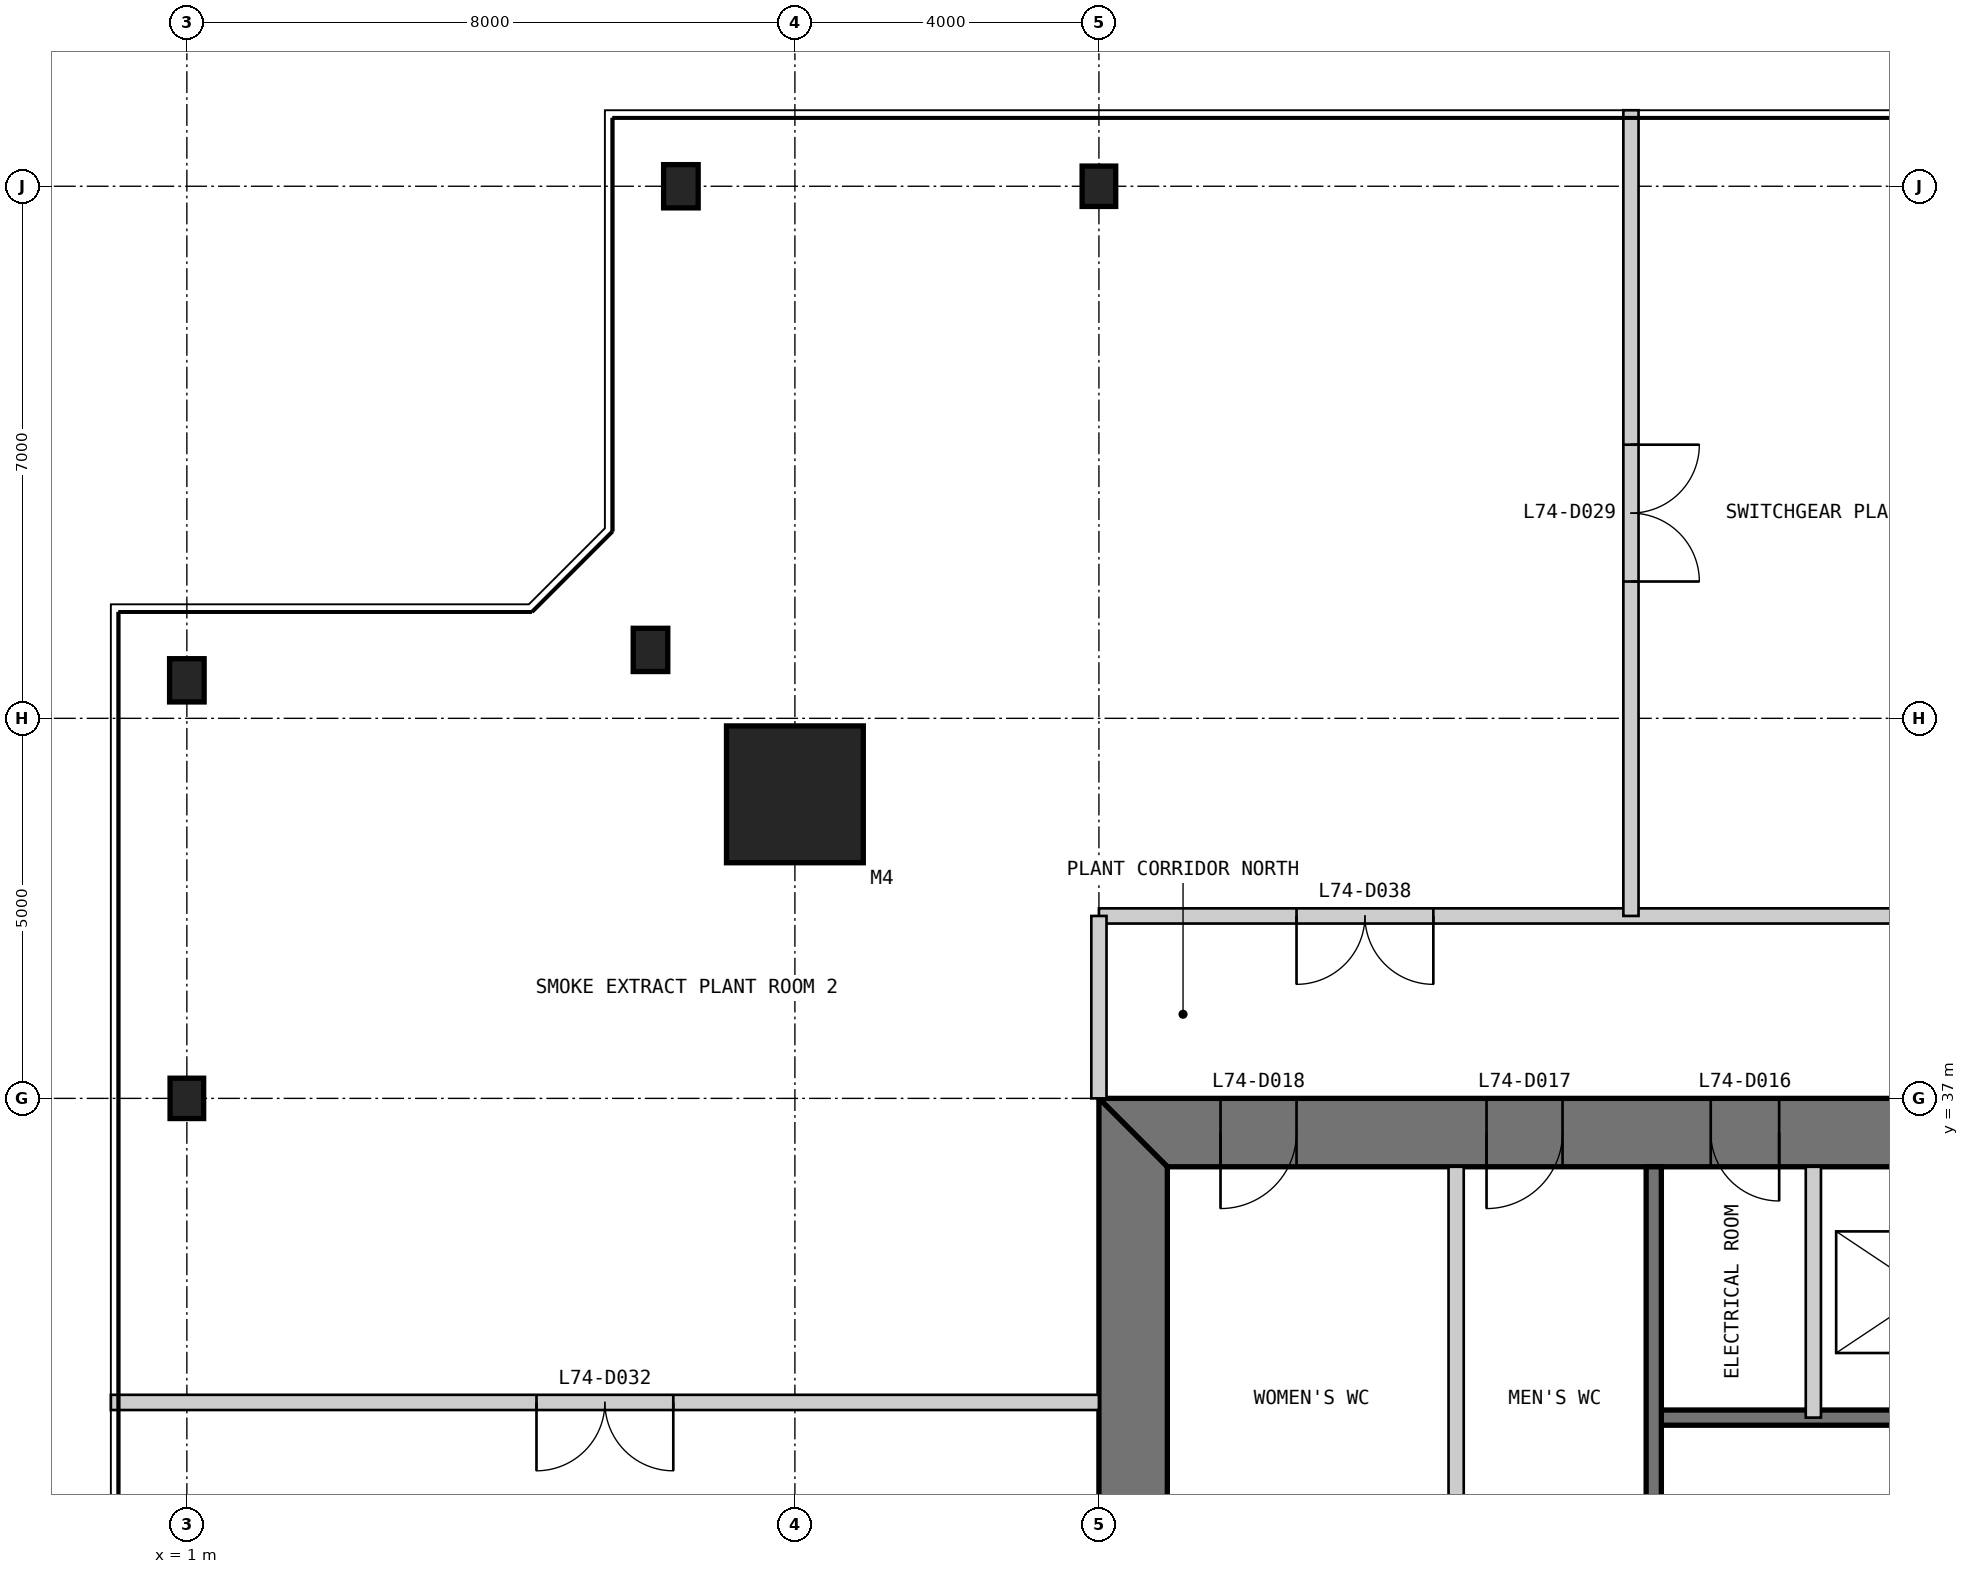
"""IFC4 building model, lengths in metres.
Left out: names, types, materials, properties, quantities, classifications, styles, units other than length and angle.
Written with IfcOpenShell. Run it as: python <this file> out.ifc"""

import sys

from ifc_helpers import new_model, si_unit, direction, frame, frame_2d, origin, origin_2d, place, context, subcontext, project, spatial, polyline, rectangle, i_section, outline, extrude, element, fill, save


model = new_model("IFC4")
c1 = context("Model", 3, precision=1e-05, world=origin(), true_north=direction((0.0, 1.0)))
c2 = subcontext(c1, "Body", "Model", "MODEL_VIEW")
j1 = project(units=[si_unit("LENGTHUNIT", "METRE"), si_unit("PLANEANGLEUNIT", "RADIAN")], contexts=[c1])
p1 = place(None, origin())
s1 = spatial("IfcSite", under=j1, at=p1, CompositionType="ELEMENT")
p2 = place(p1, origin())
s2 = spatial("IfcBuilding", under=s1, at=p2, CompositionType="ELEMENT")
p3 = place(p2, frame((0.0, 0.0, 307.8)))
s3 = spatial("IfcBuildingStorey", under=s2, at=p3, CompositionType="ELEMENT", Elevation=307.8)
p4 = place(p3, frame((9.0, 41.0, 0.0), z_axis=(0.0, 0.0, 1.0), x_axis=(1.0, 0.0, 0.0)))
e1 = element("IfcColumn", 1, at=p4, inside=s3, PredefinedType="COLUMN", context=c2, shape_type="SweptSolid", body=[
    extrude(rectangle(XDim=1.8, YDim=1.8, at=origin_2d()), origin(), (0.0, 0.0, 1.0), 5.75),
])
p5 = place(p3, frame((13.0, 49.0, 0.0), z_axis=(0.0, 0.0, 1.0), x_axis=(1.0, 0.0, 0.0)))
e2 = element("IfcColumn", 2, at=p5, inside=s3, PredefinedType="COLUMN", context=c2, shape_type="SweptSolid", body=[
    extrude(i_section(OverallWidth=0.442, OverallDepth=0.531, WebThickness=0.066, FlangeThickness=0.106, at=origin_2d()), origin(), (0.0, 0.0, 1.0), 5.75),
])
for number, where, z_axis, x_axis in (
    (3, (7.5, 49.0, 0.0), (0.0, 0.0, 1.0), (1.0, 0.0, 0.0)),
    (4, (7.1, 42.9, 0.0), (0.0, 0.0, 1.0), (1.0, 0.0, 0.0)),
    (5, (1.0, 42.5, 0.0), (0.0, 0.0, 1.0), (1.0, 0.0, 0.0)),
):
    element("IfcColumn", number, at=place(p3, frame(where, z_axis=z_axis, x_axis=x_axis)), inside=s3, PredefinedType="COLUMN", context=c2, shape_type="SweptSolid", body=[
        extrude(i_section(OverallWidth=0.455, OverallDepth=0.569, WebThickness=0.078, FlangeThickness=0.125, at=origin_2d()), origin(), (0.0, 0.0, 1.0), 5.75),
    ])
p6 = place(p3, frame((1.0, 37.0, 0.0), z_axis=(0.0, 0.0, 1.0), x_axis=(1.0, 0.0, 0.0)))
e6 = element("IfcColumn", 6, at=p6, inside=s3, PredefinedType="COLUMN", context=c2, shape_type="SweptSolid", body=[
    extrude(i_section(OverallWidth=0.442, OverallDepth=0.531, WebThickness=0.066, FlangeThickness=0.106, at=origin_2d()), origin(), (0.0, 0.0, 1.0), 5.75),
])
p7 = place(p3, frame((37.0, 36.55, 0.0), z_axis=(0.0, 0.0, 1.0), x_axis=(-1.0, 0.0, 0.0)))
e7 = element("IfcWall", 7, at=p7, inside=s3, PredefinedType="SHEAR", context=c2, shape_type="SweptSolid", body=[
    extrude(outline(polyline([(0.0, -0.45), (24.0, -0.45), (23.1, 0.45), (0.9, 0.45), (0.0, -0.45)])), origin(), (0.0, 0.0, 1.0), 5.75),
])
p8 = place(p7, frame((4.9, 0.0, 0.0)))
e8 = element("IfcOpeningElement", 8, at=p8, cuts=e7, PredefinedType="OPENING", context=c2, shape_type="SweptSolid", body=[
    extrude(rectangle(XDim=1.0, YDim=2.2, at=frame_2d((0.5, 1.1))), frame((0.0, 0.46, 0.0), z_axis=(0.0, -1.0, 0.0), x_axis=(1.0, 0.0, 0.0)), (0.0, 0.0, 1.0), 0.92),
])
p9 = place(p7, frame((8.9, 0.0, 0.0)))
e9 = element("IfcOpeningElement", 9, at=p9, cuts=e7, PredefinedType="OPENING", context=c2, shape_type="SweptSolid", body=[
    extrude(rectangle(XDim=1.1, YDim=2.2, at=frame_2d((0.55, 1.1))), frame((0.0, 0.46, 0.0), z_axis=(0.0, -1.0, 0.0), x_axis=(1.0, 0.0, 0.0)), (0.0, 0.0, 1.0), 0.92),
])
p10 = place(p7, frame((15.05, 0.0, 0.0)))
e10 = element("IfcOpeningElement", 10, at=p10, cuts=e7, PredefinedType="OPENING", context=c2, shape_type="SweptSolid", body=[
    extrude(rectangle(XDim=0.9, YDim=2.2, at=frame_2d((0.45, 1.1))), frame((0.0, 0.46, 0.0), z_axis=(0.0, -1.0, 0.0), x_axis=(1.0, 0.0, 0.0)), (0.0, 0.0, 1.0), 0.92),
])
p11 = place(p7, frame((17.9, 0.0, 0.0)))
e11 = element("IfcOpeningElement", 11, at=p11, cuts=e7, PredefinedType="OPENING", context=c2, shape_type="SweptSolid", body=[
    extrude(rectangle(XDim=1.0, YDim=2.2, at=frame_2d((0.5, 1.1))), frame((0.0, 0.46, 0.0), z_axis=(0.0, -1.0, 0.0), x_axis=(1.0, 0.0, 0.0)), (0.0, 0.0, 1.0), 0.92),
])
p12 = place(p7, frame((21.4, 0.0, 0.0)))
e12 = element("IfcOpeningElement", 12, at=p12, cuts=e7, PredefinedType="OPENING", context=c2, shape_type="SweptSolid", body=[
    extrude(rectangle(XDim=1.0, YDim=2.2, at=frame_2d((0.5, 1.1))), frame((0.0, 0.46, 0.0), z_axis=(0.0, -1.0, 0.0), x_axis=(1.0, 0.0, 0.0)), (0.0, 0.0, 1.0), 0.92),
])
p13 = place(p3, frame((13.45, 36.1, 0.0), z_axis=(0.0, 0.0, 1.0), x_axis=(0.0, -1.0, 0.0)))
e13 = element("IfcWall", 13, at=p13, inside=s3, PredefinedType="SHEAR", context=c2, shape_type="SweptSolid", body=[
    extrude(outline(polyline([(-0.9, -0.45), (23.1, -0.45), (22.2, 0.45), (0.0, 0.45), (-0.9, -0.45)])), origin(), (0.0, 0.0, 1.0), 5.75),
])
p14 = place(p13, frame((20.2, 0.0, 0.0)))
e14 = element("IfcOpeningElement", 14, at=p14, cuts=e13, PredefinedType="OPENING", context=c2, shape_type="SweptSolid", body=[
    extrude(rectangle(XDim=1.0, YDim=2.2, at=frame_2d((0.5, 1.1))), frame((0.0, 0.46, 0.0), z_axis=(0.0, -1.0, 0.0), x_axis=(1.0, 0.0, 0.0)), (0.0, 0.0, 1.0), 0.92),
])
p15 = place(p13, frame((17.25, 0.0, 0.0)))
e15 = element("IfcOpeningElement", 15, at=p15, cuts=e13, PredefinedType="OPENING", context=c2, shape_type="SweptSolid", body=[
    extrude(rectangle(XDim=0.9, YDim=2.2, at=frame_2d((0.45, 1.1))), frame((0.0, 0.46, 0.0), z_axis=(0.0, -1.0, 0.0), x_axis=(1.0, 0.0, 0.0)), (0.0, 0.0, 1.0), 0.92),
])
p16 = place(p3, frame((29.7, 32.8, 0.0), z_axis=(0.0, 0.0, 1.0), x_axis=(-1.0, 0.0, 0.0)))
e16 = element("IfcWall", 16, at=p16, inside=s3, PredefinedType="SOLIDWALL", context=c2, shape_type="SweptSolid", body=[
    extrude(rectangle(XDim=9.4, YDim=0.2, at=frame_2d((4.7, 0.0))), origin(), (0.0, 0.0, 1.0), 5.75),
])
p17 = place(p16, frame((0.25, 0.0, 0.0)))
e17 = element("IfcOpeningElement", 17, at=p17, cuts=e16, PredefinedType="OPENING", context=c2, shape_type="SweptSolid", body=[
    extrude(rectangle(XDim=1.0, YDim=2.2, at=frame_2d((0.5, 1.1))), frame((0.0, 0.11, 0.0), z_axis=(0.0, -1.0, 0.0), x_axis=(1.0, 0.0, 0.0)), (0.0, 0.0, 1.0), 0.22),
])
p18 = place(p3, frame((22.4, 36.1, 0.0), z_axis=(0.0, 0.0, 1.0), x_axis=(0.0, -1.0, 0.0)))
e18 = element("IfcWall", 18, at=p18, inside=s3, PredefinedType="PARTITIONING", context=c2, shape_type="SweptSolid", body=[
    extrude(rectangle(XDim=3.3, YDim=0.2, at=frame_2d((1.65, 0.0))), origin(), (0.0, 0.0, 1.0), 5.75),
])
p19 = place(p3, frame((20.3, 36.1, 0.0), z_axis=(0.0, 0.0, 1.0), x_axis=(0.0, -1.0, 0.0)))
e19 = element("IfcWall", 19, at=p19, inside=s3, PredefinedType="SOLIDWALL", context=c2, shape_type="SweptSolid", body=[
    extrude(rectangle(XDim=6.1, YDim=0.2, at=frame_2d((3.05, 0.0))), origin(), (0.0, 0.0, 1.0), 5.75),
])
p20 = place(p3, frame((17.7, 36.1, 0.0), z_axis=(0.0, 0.0, 1.0), x_axis=(0.0, -1.0, 0.0)))
e20 = element("IfcWall", 20, at=p20, inside=s3, PredefinedType="PARTITIONING", context=c2, shape_type="SweptSolid", body=[
    extrude(rectangle(XDim=6.1, YDim=0.2, at=frame_2d((3.05, 0.0))), origin(), (0.0, 0.0, 1.0), 5.75),
])
p21 = place(p3, frame((13.0, 39.4, 0.0), z_axis=(0.0, 0.0, 1.0), x_axis=(1.0, 0.0, 0.0)))
e21 = element("IfcWall", 21, at=p21, inside=s3, PredefinedType="PARTITIONING", context=c2, shape_type="SweptSolid", body=[
    extrude(rectangle(XDim=24.0, YDim=0.2, at=frame_2d((12.0, 0.0))), origin(), (0.0, 0.0, 1.0), 5.75),
])
p22 = place(p21, frame((19.35, 0.0, 0.0)))
e22 = element("IfcOpeningElement", 22, at=p22, cuts=e21, PredefinedType="OPENING", context=c2, shape_type="SweptSolid", body=[
    extrude(rectangle(XDim=1.8, YDim=2.4, at=frame_2d((0.9, 1.2))), frame((0.0, 0.11, 0.0), z_axis=(0.0, -1.0, 0.0), x_axis=(1.0, 0.0, 0.0)), (0.0, 0.0, 1.0), 0.22),
])
p23 = place(p21, frame((2.6, 0.0, 0.0)))
e23 = element("IfcOpeningElement", 23, at=p23, cuts=e21, PredefinedType="OPENING", context=c2, shape_type="SweptSolid", body=[
    extrude(rectangle(XDim=1.8, YDim=2.4, at=frame_2d((0.9, 1.2))), frame((0.0, 0.11, 0.0), z_axis=(0.0, -1.0, 0.0), x_axis=(1.0, 0.0, 0.0)), (0.0, 0.0, 1.0), 0.22),
])
p24 = place(p21, frame((10.85, 0.0, 0.0)))
e24 = element("IfcOpeningElement", 24, at=p24, cuts=e21, PredefinedType="OPENING", context=c2, shape_type="SweptSolid", body=[
    extrude(rectangle(XDim=1.8, YDim=2.4, at=frame_2d((0.9, 1.2))), frame((0.0, 0.11, 0.0), z_axis=(0.0, -1.0, 0.0), x_axis=(1.0, 0.0, 0.0)), (0.0, 0.0, 1.0), 0.22),
])
p25 = place(p3, frame((13.0, 37.0, 0.0), z_axis=(0.0, 0.0, 1.0), x_axis=(0.0, 1.0, 0.0)))
e25 = element("IfcWall", 25, at=p25, inside=s3, PredefinedType="PARTITIONING", context=c2, shape_type="SweptSolid", body=[
    extrude(rectangle(XDim=2.4, YDim=0.2, at=frame_2d((1.2, 0.0))), origin(), (0.0, 0.0, 1.0), 4.802),
])
p26 = place(p3, frame((20.0, 39.4, 0.0), z_axis=(0.0, 0.0, 1.0), x_axis=(0.0, 1.0, 0.0)))
e26 = element("IfcWall", 26, at=p26, inside=s3, PredefinedType="PARTITIONING", context=c2, shape_type="SweptSolid", body=[
    extrude(rectangle(XDim=10.6, YDim=0.2, at=frame_2d((5.3, 0.0))), origin(), (0.0, 0.0, 1.0), 5.75),
])
p27 = place(p26, frame((4.4, 0.0, 0.0)))
e27 = element("IfcOpeningElement", 27, at=p27, cuts=e26, PredefinedType="OPENING", context=c2, shape_type="SweptSolid", body=[
    extrude(rectangle(XDim=1.8, YDim=2.4, at=frame_2d((0.9, 1.2))), frame((0.0, 0.11, 0.0), z_axis=(0.0, -1.0, 0.0), x_axis=(1.0, 0.0, 0.0)), (0.0, 0.0, 1.0), 0.22),
])
p28 = place(p3, frame((0.0, 33.0, 0.0), z_axis=(0.0, 0.0, 1.0), x_axis=(1.0, 0.0, 0.0)))
e28 = element("IfcWall", 28, at=p28, inside=s3, PredefinedType="PARTITIONING", context=c2, shape_type="SweptSolid", body=[
    extrude(rectangle(XDim=13.0, YDim=0.2, at=frame_2d((6.5, 0.0))), origin(), (0.0, 0.0, 1.0), 5.75),
])
p29 = place(p28, frame((5.6, 0.0, 0.0)))
e29 = element("IfcOpeningElement", 29, at=p29, cuts=e28, PredefinedType="OPENING", context=c2, shape_type="SweptSolid", body=[
    extrude(rectangle(XDim=1.8, YDim=2.4, at=frame_2d((0.9, 1.2))), frame((0.0, 0.11, 0.0), z_axis=(0.0, -1.0, 0.0), x_axis=(1.0, 0.0, 0.0)), (0.0, 0.0, 1.0), 0.22),
])
p30 = place(p10, origin())
e30 = element("IfcDoor", 30, at=p30, inside=s3, OperationType="SINGLE_SWING_LEFT", PredefinedType="DOOR", context=c2, shape_type="SweptSolid", body=[
    extrude(rectangle(XDim=0.9, YDim=2.2, at=frame_2d((0.45, 1.1))), frame((0.0, 0.025, 0.0), z_axis=(0.0, -1.0, 0.0), x_axis=(1.0, 0.0, 0.0)), (0.0, 0.0, 1.0), 0.05),
    extrude(outline(polyline([(0.0, 0.0), (0.04, 0.0), (0.04, 2.16), (0.86, 2.16), (0.86, 0.0), (0.9, 0.0), (0.9, 2.2), (0.0, 2.2), (0.0, 0.0)])), frame((0.0, 0.3, 0.0), z_axis=(0.0, -1.0, 0.0), x_axis=(1.0, 0.0, 0.0)), (0.0, 0.0, 1.0), 0.6),
])
fill(e10, e30)
p31 = place(p11, origin())
e31 = element("IfcDoor", 31, at=p31, inside=s3, OperationType="SINGLE_SWING_RIGHT", PredefinedType="DOOR", context=c2, shape_type="SweptSolid", body=[
    extrude(rectangle(XDim=1.0, YDim=2.2, at=frame_2d((0.5, 1.1))), frame((0.0, 0.025, 0.0), z_axis=(0.0, -1.0, 0.0), x_axis=(1.0, 0.0, 0.0)), (0.0, 0.0, 1.0), 0.05),
    extrude(outline(polyline([(0.0, 0.0), (0.04, 0.0), (0.04, 2.16), (0.96, 2.16), (0.96, 0.0), (1.0, 0.0), (1.0, 2.2), (0.0, 2.2), (0.0, 0.0)])), frame((0.0, 0.3, 0.0), z_axis=(0.0, -1.0, 0.0), x_axis=(1.0, 0.0, 0.0)), (0.0, 0.0, 1.0), 0.6),
])
fill(e11, e31)
p32 = place(p12, origin())
e32 = element("IfcDoor", 32, at=p32, inside=s3, OperationType="SINGLE_SWING_RIGHT", PredefinedType="DOOR", context=c2, shape_type="SweptSolid", body=[
    extrude(rectangle(XDim=1.0, YDim=2.2, at=frame_2d((0.5, 1.1))), frame((0.0, 0.025, 0.0), z_axis=(0.0, -1.0, 0.0), x_axis=(1.0, 0.0, 0.0)), (0.0, 0.0, 1.0), 0.05),
    extrude(outline(polyline([(0.0, 0.0), (0.04, 0.0), (0.04, 2.16), (0.96, 2.16), (0.96, 0.0), (1.0, 0.0), (1.0, 2.2), (0.0, 2.2), (0.0, 0.0)])), frame((0.0, 0.3, 0.0), z_axis=(0.0, -1.0, 0.0), x_axis=(1.0, 0.0, 0.0)), (0.0, 0.0, 1.0), 0.6),
])
fill(e12, e32)
p33 = place(p27, frame((1.8, 0.0, 0.0), z_axis=(0.0, 0.0, 1.0), x_axis=(-1.0, 0.0, 0.0)))
e33 = element("IfcDoor", 33, at=p33, inside=s3, OperationType="DOUBLE_DOOR_SINGLE_SWING", PredefinedType="DOOR", context=c2, shape_type="SweptSolid", body=[
    extrude(rectangle(XDim=1.8, YDim=2.4, at=frame_2d((0.9, 1.2))), frame((0.0, 0.025, 0.0), z_axis=(0.0, -1.0, 0.0), x_axis=(1.0, 0.0, 0.0)), (0.0, 0.0, 1.0), 0.05),
])
fill(e27, e33)
p34 = place(p29, frame((1.8, 0.0, 0.0), z_axis=(0.0, 0.0, 1.0), x_axis=(-1.0, 0.0, 0.0)))
e34 = element("IfcDoor", 34, at=p34, inside=s3, OperationType="DOUBLE_DOOR_SINGLE_SWING", PredefinedType="DOOR", context=c2, shape_type="SweptSolid", body=[
    extrude(rectangle(XDim=1.8, YDim=2.4, at=frame_2d((0.9, 1.2))), frame((0.0, 0.025, 0.0), z_axis=(0.0, -1.0, 0.0), x_axis=(1.0, 0.0, 0.0)), (0.0, 0.0, 1.0), 0.05),
])
fill(e29, e34)
p35 = place(p23, frame((1.8, 0.0, 0.0), z_axis=(0.0, 0.0, 1.0), x_axis=(-1.0, 0.0, 0.0)))
e35 = element("IfcDoor", 35, at=p35, inside=s3, OperationType="DOUBLE_DOOR_SINGLE_SWING", PredefinedType="DOOR", context=c2, shape_type="SweptSolid", body=[
    extrude(rectangle(XDim=1.8, YDim=2.4, at=frame_2d((0.9, 1.2))), frame((0.0, 0.025, 0.0), z_axis=(0.0, -1.0, 0.0), x_axis=(1.0, 0.0, 0.0)), (0.0, 0.0, 1.0), 0.05),
])
fill(e23, e35)
save(model, sys.argv[1])
